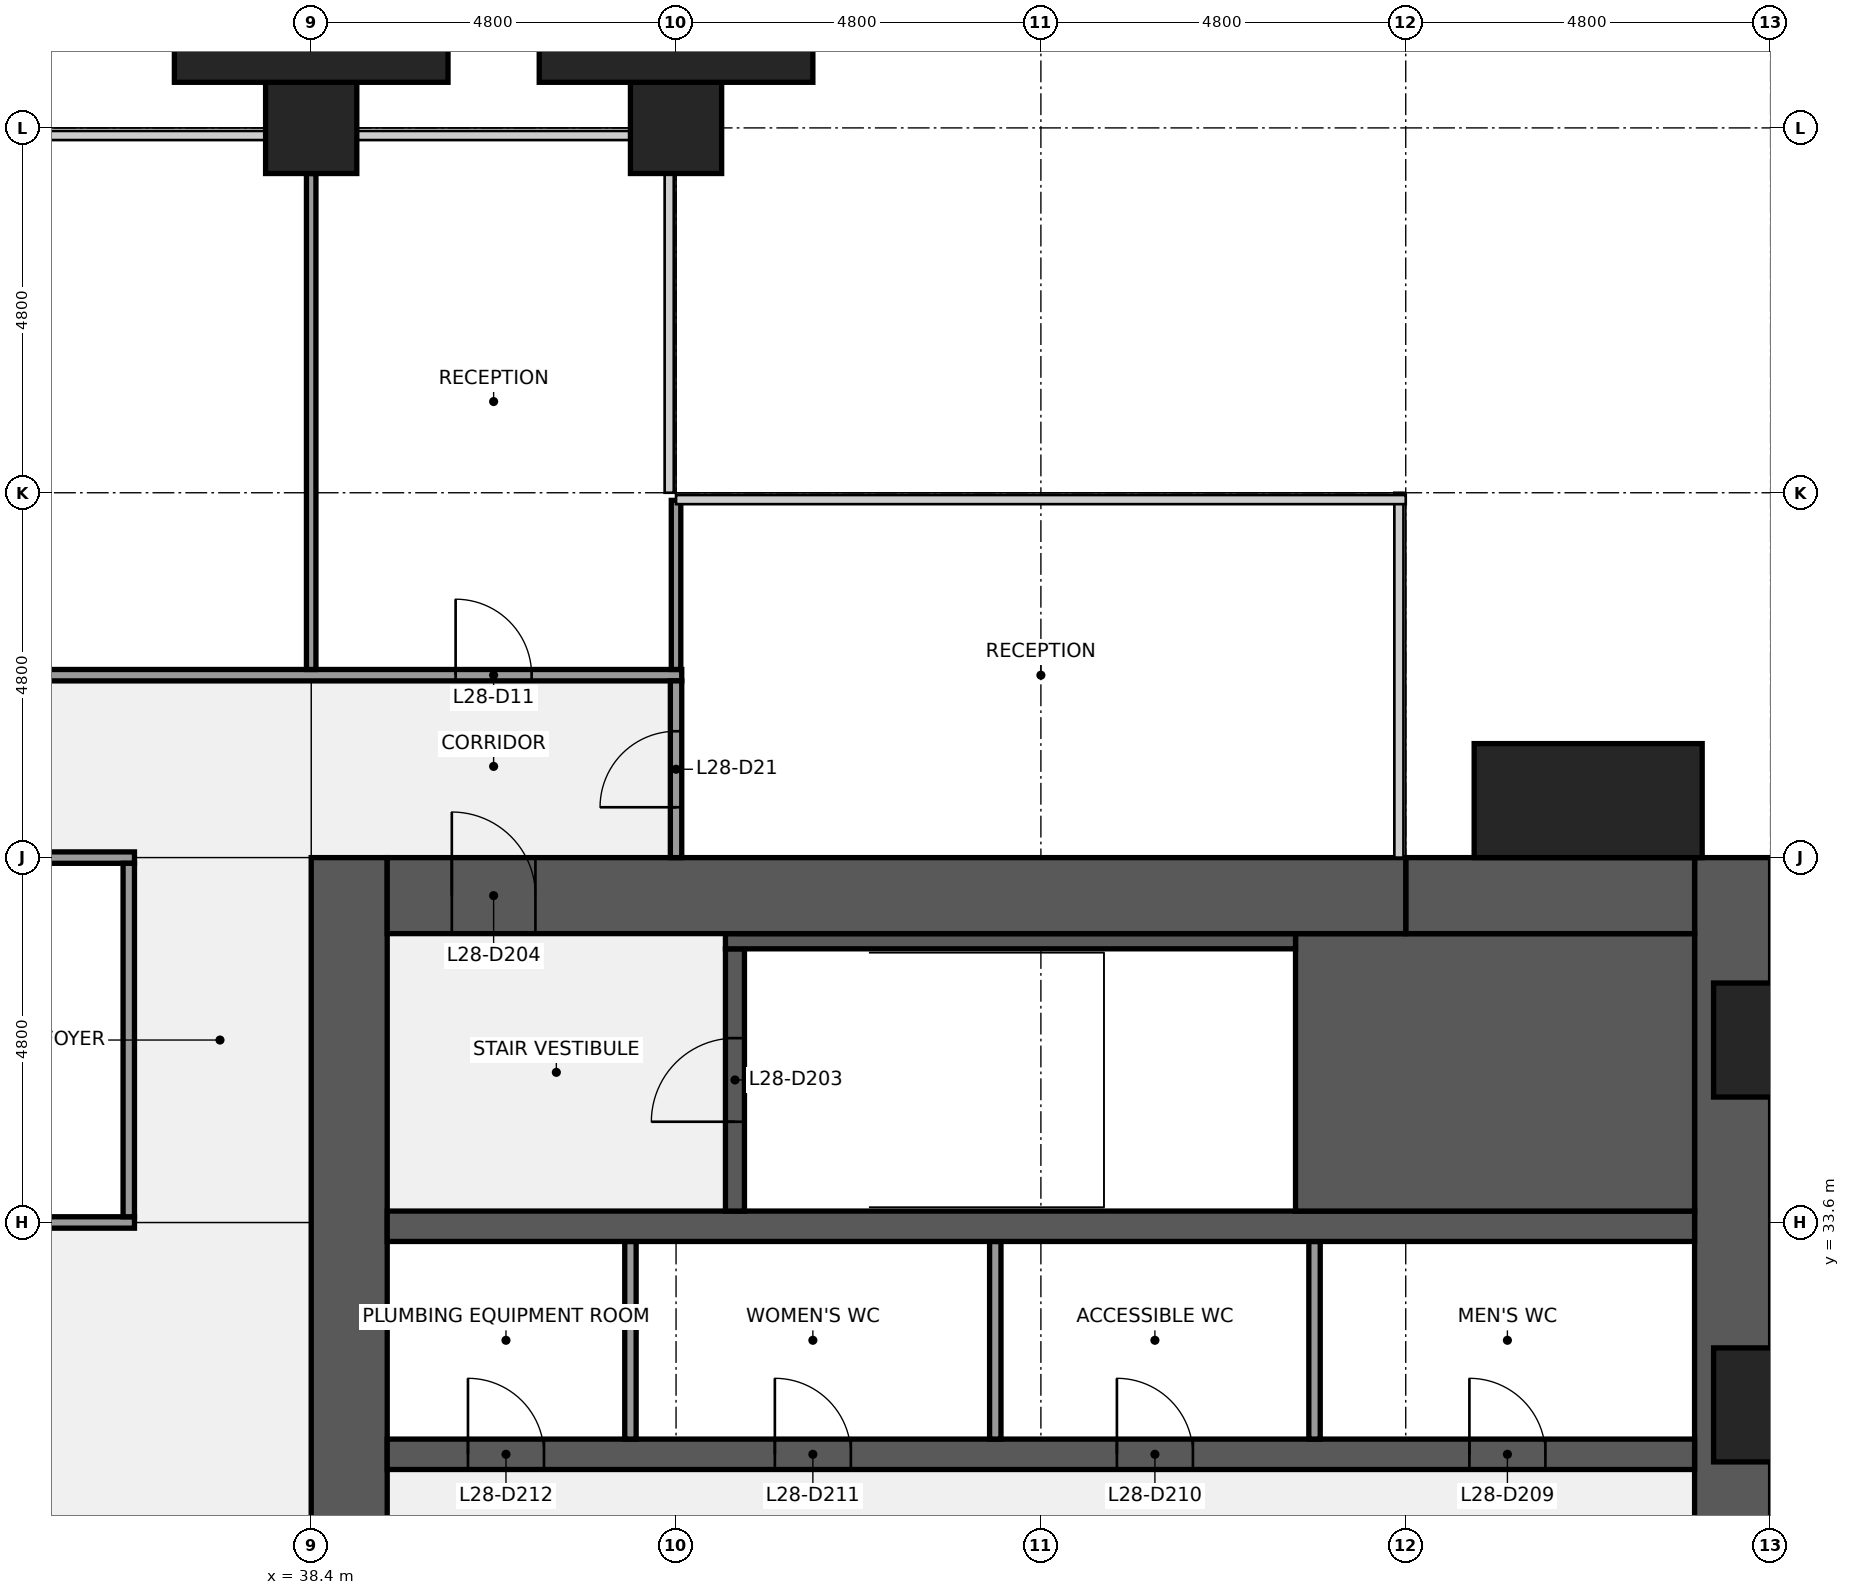
"""IFC4 building model, lengths in metres.
Left out: names, types, materials, properties, quantities, classifications, styles, units other than length and angle.
Written with IfcOpenShell. Run it as: python <this file> out.ifc"""

import sys

from ifc_helpers import new_model, si_unit, direction, frame, frame_2d, origin, origin_2d, place, context, subcontext, project, spatial, rectangle, extrude, element, fill, save


model = new_model("IFC4")
c1 = context("Model", 3, precision=1e-05, world=origin(), true_north=direction((0.0, 1.0)))
c2 = subcontext(c1, "Body", "Model", "MODEL_VIEW")
j1 = project(units=[si_unit("LENGTHUNIT", "METRE"), si_unit("PLANEANGLEUNIT", "RADIAN")], contexts=[c1])
p1 = place(None, origin())
s1 = spatial("IfcSite", under=j1, at=p1, CompositionType="ELEMENT")
p2 = place(p1, origin())
s2 = spatial("IfcBuilding", under=s1, at=p2, CompositionType="ELEMENT")
p3 = place(p2, frame((0.0, 0.0, 132.1)))
s3 = spatial("IfcBuildingStorey", under=s2, at=p3, CompositionType="ELEMENT", Elevation=132.1)
for number, where, z_axis, x_axis in (
    (1, (38.4, 48.0, 0.0), (0.0, 0.0, 1.0), (1.0, 0.0, 0.0)),
    (2, (43.2, 48.0, 0.0), (0.0, 0.0, 1.0), (1.0, 0.0, 0.0)),
):
    element("IfcColumn", number, at=place(p3, frame(where, z_axis=z_axis, x_axis=x_axis)), inside=s3, PredefinedType="COLUMN", context=c2, shape_type="SweptSolid", body=[
        extrude(rectangle(XDim=1.2, YDim=1.2, at=origin_2d()), origin(), (0.0, 0.0, 1.0), 4.0),
    ])
p4 = place(p3, frame((57.1, 38.4, 0.0), z_axis=(0.0, 0.0, 1.0), x_axis=(0.0, -1.0, 0.0)))
e3 = element("IfcWall", 3, at=p4, inside=s3, PredefinedType="SHEAR", context=c2, shape_type="SweptSolid", body=[
    extrude(rectangle(XDim=28.8, YDim=1.0, at=frame_2d((14.4, 0.0))), origin(), (0.0, 0.0, 1.0), 3.84),
])
p5 = place(p4, frame((18.45, 0.0, 0.9)))
e4 = element("IfcOpeningElement", 4, at=p5, cuts=e3, PredefinedType="OPENING", context=c2, shape_type="SweptSolid", body=[
    extrude(rectangle(XDim=1.5, YDim=1.5, at=frame_2d((0.75, 0.75))), frame((0.0, 0.51, 0.0), z_axis=(0.0, -1.0, 0.0), x_axis=(1.0, 0.0, 0.0)), (0.0, 0.0, 1.0), 1.02),
])
p6 = place(p4, frame((8.85, 0.0, 0.9)))
e5 = element("IfcOpeningElement", 5, at=p6, cuts=e3, PredefinedType="OPENING", context=c2, shape_type="SweptSolid", body=[
    extrude(rectangle(XDim=1.5, YDim=1.5, at=frame_2d((0.75, 0.75))), frame((0.0, 0.51, 0.0), z_axis=(0.0, -1.0, 0.0), x_axis=(1.0, 0.0, 0.0)), (0.0, 0.0, 1.0), 1.02),
])
p7 = place(p3, frame((38.9, 9.6, 0.0), z_axis=(0.0, 0.0, 1.0), x_axis=(0.0, 1.0, 0.0)))
e6 = element("IfcWall", 6, at=p7, inside=s3, PredefinedType="SHEAR", context=c2, shape_type="SweptSolid", body=[
    extrude(rectangle(XDim=28.8, YDim=1.0, at=frame_2d((14.4, 0.0))), origin(), (0.0, 0.0, 1.0), 3.84),
])
p8 = place(p7, frame((8.7, 0.0, 0.0)))
e7 = element("IfcOpeningElement", 7, at=p8, cuts=e6, PredefinedType="OPENING", context=c2, shape_type="SweptSolid", body=[
    extrude(rectangle(XDim=1.8, YDim=2.1, at=frame_2d((0.9, 1.05))), frame((0.0, 0.51, 0.0), z_axis=(0.0, -1.0, 0.0), x_axis=(1.0, 0.0, 0.0)), (0.0, 0.0, 1.0), 1.02),
])
p9 = place(p7, frame((18.3, 0.0, 0.0)))
e8 = element("IfcOpeningElement", 8, at=p9, cuts=e6, PredefinedType="OPENING", context=c2, shape_type="SweptSolid", body=[
    extrude(rectangle(XDim=1.8, YDim=2.1, at=frame_2d((0.9, 1.05))), frame((0.0, 0.51, 0.0), z_axis=(0.0, -1.0, 0.0), x_axis=(1.0, 0.0, 0.0)), (0.0, 0.0, 1.0), 1.02),
])
p10 = place(p3, frame((39.4, 30.55, 0.0), z_axis=(0.0, 0.0, 1.0), x_axis=(1.0, 0.0, 0.0)))
e9 = element("IfcWall", 9, at=p10, inside=s3, PredefinedType="SHEAR", context=c2, shape_type="SweptSolid", body=[
    extrude(rectangle(XDim=17.2, YDim=0.4, at=frame_2d((8.6, 0.0))), origin(), (0.0, 0.0, 1.0), 3.84),
])
p11 = place(p10, frame((14.238, 0.0, 0.0)))
e10 = element("IfcOpeningElement", 10, at=p11, cuts=e9, PredefinedType="OPENING", context=c2, shape_type="SweptSolid", body=[
    extrude(rectangle(XDim=1.0, YDim=2.1, at=frame_2d((0.5, 1.05))), frame((0.0, 0.21, 0.0), z_axis=(0.0, -1.0, 0.0), x_axis=(1.0, 0.0, 0.0)), (0.0, 0.0, 1.0), 0.42),
])
p12 = place(p10, frame((9.6, 0.0, 0.0)))
e11 = element("IfcOpeningElement", 11, at=p12, cuts=e9, PredefinedType="OPENING", context=c2, shape_type="SweptSolid", body=[
    extrude(rectangle(XDim=1.0, YDim=2.1, at=frame_2d((0.5, 1.05))), frame((0.0, 0.21, 0.0), z_axis=(0.0, -1.0, 0.0), x_axis=(1.0, 0.0, 0.0)), (0.0, 0.0, 1.0), 0.42),
])
p13 = place(p10, frame((5.1, 0.0, 0.0)))
e12 = element("IfcOpeningElement", 12, at=p13, cuts=e9, PredefinedType="OPENING", context=c2, shape_type="SweptSolid", body=[
    extrude(rectangle(XDim=1.0, YDim=2.1, at=frame_2d((0.5, 1.05))), frame((0.0, 0.21, 0.0), z_axis=(0.0, -1.0, 0.0), x_axis=(1.0, 0.0, 0.0)), (0.0, 0.0, 1.0), 0.42),
])
p14 = place(p10, frame((1.062, 0.0, 0.0)))
e13 = element("IfcOpeningElement", 13, at=p14, cuts=e9, PredefinedType="OPENING", context=c2, shape_type="SweptSolid", body=[
    extrude(rectangle(XDim=1.0, YDim=2.1, at=frame_2d((0.5, 1.05))), frame((0.0, 0.21, 0.0), z_axis=(0.0, -1.0, 0.0), x_axis=(1.0, 0.0, 0.0)), (0.0, 0.0, 1.0), 0.42),
])
for number, where, z_axis, x_axis in (
    (14, (51.6, 30.75, 0.0), (0.0, 0.0, 1.0), (0.0, 1.0, 0.0)),
    (15, (47.4, 30.75, 0.0), (0.0, 0.0, 1.0), (0.0, 1.0, 0.0)),
    (16, (42.6, 30.75, 0.0), (0.0, 0.0, 1.0), (0.0, 1.0, 0.0)),
):
    element("IfcWall", number, at=place(p3, frame(where, z_axis=z_axis, x_axis=x_axis)), inside=s3, PredefinedType="PARTITIONING", context=c2, shape_type="SweptSolid", body=[
        extrude(rectangle(XDim=2.6, YDim=0.15, at=frame_2d((1.3, 0.0))), origin(), (0.0, 0.0, 1.0), 3.84),
    ])
p15 = place(p3, frame((39.4, 33.55, 0.0), z_axis=(0.0, 0.0, 1.0), x_axis=(1.0, 0.0, 0.0)))
e17 = element("IfcWall", 17, at=p15, inside=s3, PredefinedType="SHEAR", context=c2, shape_type="SweptSolid", body=[
    extrude(rectangle(XDim=17.2, YDim=0.4, at=frame_2d((8.6, 0.0))), origin(), (0.0, 0.0, 1.0), 3.84),
])
p16 = place(p3, frame((51.35, 35.575, 0.0), z_axis=(0.0, 0.0, 1.0), x_axis=(1.0, 0.0, 0.0)))
e18 = element("IfcWall", 18, at=p16, inside=s3, PredefinedType="SHEAR", context=c2, shape_type="SweptSolid", body=[
    extrude(rectangle(XDim=5.25, YDim=3.65, at=frame_2d((2.625, 0.0))), origin(), (0.0, 0.0, 1.0), 3.84),
])
p17 = place(p3, frame((43.975, 33.75, 0.0), z_axis=(0.0, 0.0, 1.0), x_axis=(0.0, 1.0, 0.0)))
e19 = element("IfcWall", 19, at=p17, inside=s3, PredefinedType="SHEAR", context=c2, shape_type="SweptSolid", body=[
    extrude(rectangle(XDim=3.45, YDim=0.25, at=frame_2d((1.725, 0.0))), origin(), (0.0, 0.0, 1.0), 3.84),
])
p18 = place(p17, frame((1.175, 0.0, 0.0)))
e20 = element("IfcOpeningElement", 20, at=p18, cuts=e19, PredefinedType="OPENING", context=c2, shape_type="SweptSolid", body=[
    extrude(rectangle(XDim=1.1, YDim=2.1, at=frame_2d((0.55, 1.05))), frame((0.0, 0.135, 0.0), z_axis=(0.0, -1.0, 0.0), x_axis=(1.0, 0.0, 0.0)), (0.0, 0.0, 1.0), 0.27),
])
p19 = place(p3, frame((43.85, 37.3, 0.0), z_axis=(0.0, 0.0, 1.0), x_axis=(1.0, 0.0, 0.0)))
e21 = element("IfcWall", 21, at=p19, inside=s3, PredefinedType="SHEAR", context=c2, shape_type="SweptSolid", body=[
    extrude(rectangle(XDim=7.5, YDim=0.2, at=frame_2d((3.75, 0.0))), origin(), (0.0, 0.0, 1.0), 3.84),
])
p20 = place(p3, frame((52.8, 37.9, 0.0), z_axis=(0.0, 0.0, 1.0), x_axis=(1.0, 0.0, 0.0)))
e22 = element("IfcWall", 22, at=p20, inside=s3, PredefinedType="SHEAR", context=c2, shape_type="SweptSolid", body=[
    extrude(rectangle(XDim=3.8, YDim=1.0, at=frame_2d((1.9, 0.0))), origin(), (0.0, 0.0, 1.0), 3.84),
])
p21 = place(p3, frame((39.4, 37.9, 0.0), z_axis=(0.0, 0.0, 1.0), x_axis=(1.0, 0.0, 0.0)))
e23 = element("IfcWall", 23, at=p21, inside=s3, PredefinedType="SHEAR", context=c2, shape_type="SweptSolid", body=[
    extrude(rectangle(XDim=13.4, YDim=1.0, at=frame_2d((6.7, 0.0))), origin(), (0.0, 0.0, 1.0), 3.84),
])
p22 = place(p21, frame((0.85, 0.0, 0.0)))
e24 = element("IfcOpeningElement", 24, at=p22, cuts=e23, PredefinedType="OPENING", context=c2, shape_type="SweptSolid", body=[
    extrude(rectangle(XDim=1.1, YDim=2.1, at=frame_2d((0.55, 1.05))), frame((0.0, 0.51, 0.0), z_axis=(0.0, -1.0, 0.0), x_axis=(1.0, 0.0, 0.0)), (0.0, 0.0, 1.0), 1.02),
])
p23 = place(p3, frame((31.275, 33.6, 0.0), z_axis=(0.0, 0.0, 1.0), x_axis=(1.0, 0.0, 0.0)))
e25 = element("IfcWall", 25, at=p23, inside=s3, PredefinedType="PARTITIONING", context=c2, shape_type="SweptSolid", body=[
    extrude(rectangle(XDim=4.8, YDim=0.15, at=frame_2d((2.4, 0.0))), origin(), (0.0, 0.0, 1.0), 2.936),
])
p24 = place(p3, frame((21.525, 38.4, 0.0), z_axis=(0.0, 0.0, 1.0), x_axis=(1.0, 0.0, 0.0)))
e26 = element("IfcWall", 26, at=p24, inside=s3, PredefinedType="PARTITIONING", context=c2, shape_type="SweptSolid", body=[
    extrude(rectangle(XDim=14.55, YDim=0.15, at=frame_2d((7.275, 0.0))), origin(), (0.0, 0.0, 1.0), 2.936),
])
p25 = place(p24, frame((6.775, 0.0, 0.0)))
e27 = element("IfcOpeningElement", 27, at=p25, cuts=e26, PredefinedType="OPENING", context=c2, shape_type="SweptSolid", body=[
    extrude(rectangle(XDim=1.0, YDim=2.1, at=frame_2d((0.5, 1.05))), frame((0.0, 0.085, 0.0), z_axis=(0.0, -1.0, 0.0), x_axis=(1.0, 0.0, 0.0)), (0.0, 0.0, 1.0), 0.17),
])
p26 = place(p3, frame((14.325, 40.8, 0.0), z_axis=(0.0, 0.0, 1.0), x_axis=(1.0, 0.0, 0.0)))
e28 = element("IfcWall", 28, at=p26, inside=s3, PredefinedType="PARTITIONING", context=c2, shape_type="SweptSolid", body=[
    extrude(rectangle(XDim=28.95, YDim=0.15, at=frame_2d((14.475, 0.0))), origin(), (0.0, 0.0, 1.0), 2.936),
])
p27 = place(p26, frame((1.975, 0.0, 0.0)))
e29 = element("IfcOpeningElement", 29, at=p27, cuts=e28, PredefinedType="OPENING", context=c2, shape_type="SweptSolid", body=[
    extrude(rectangle(XDim=1.0, YDim=2.1, at=frame_2d((0.5, 1.05))), frame((0.0, 0.085, 0.0), z_axis=(0.0, -1.0, 0.0), x_axis=(1.0, 0.0, 0.0)), (0.0, 0.0, 1.0), 0.17),
])
p28 = place(p26, frame((7.975, 0.0, 0.0)))
e30 = element("IfcOpeningElement", 30, at=p28, cuts=e28, PredefinedType="OPENING", context=c2, shape_type="SweptSolid", body=[
    extrude(rectangle(XDim=1.0, YDim=2.1, at=frame_2d((0.5, 1.05))), frame((0.0, 0.085, 0.0), z_axis=(0.0, -1.0, 0.0), x_axis=(1.0, 0.0, 0.0)), (0.0, 0.0, 1.0), 0.17),
])
p29 = place(p26, frame((12.775, 0.0, 0.0)))
e31 = element("IfcOpeningElement", 31, at=p29, cuts=e28, PredefinedType="OPENING", context=c2, shape_type="SweptSolid", body=[
    extrude(rectangle(XDim=1.0, YDim=2.1, at=frame_2d((0.5, 1.05))), frame((0.0, 0.085, 0.0), z_axis=(0.0, -1.0, 0.0), x_axis=(1.0, 0.0, 0.0)), (0.0, 0.0, 1.0), 0.17),
])
p30 = place(p26, frame((18.775, 0.0, 0.0)))
e32 = element("IfcOpeningElement", 32, at=p30, cuts=e28, PredefinedType="OPENING", context=c2, shape_type="SweptSolid", body=[
    extrude(rectangle(XDim=1.0, YDim=2.1, at=frame_2d((0.5, 1.05))), frame((0.0, 0.085, 0.0), z_axis=(0.0, -1.0, 0.0), x_axis=(1.0, 0.0, 0.0)), (0.0, 0.0, 1.0), 0.17),
])
p31 = place(p26, frame((25.975, 0.0, 0.0)))
e33 = element("IfcOpeningElement", 33, at=p31, cuts=e28, PredefinedType="OPENING", context=c2, shape_type="SweptSolid", body=[
    extrude(rectangle(XDim=1.0, YDim=2.1, at=frame_2d((0.5, 1.05))), frame((0.0, 0.085, 0.0), z_axis=(0.0, -1.0, 0.0), x_axis=(1.0, 0.0, 0.0)), (0.0, 0.0, 1.0), 0.17),
])
p32 = place(p3, frame((36.0, 33.675, 0.0), z_axis=(0.0, 0.0, 1.0), x_axis=(0.0, 1.0, 0.0)))
e34 = element("IfcWall", 34, at=p32, inside=s3, PredefinedType="PARTITIONING", context=c2, shape_type="SweptSolid", body=[
    extrude(rectangle(XDim=4.65, YDim=0.15, at=frame_2d((2.325, 0.0))), origin(), (0.0, 0.0, 1.0), 2.936),
])
p33 = place(p3, frame((38.4, 40.875, 0.0), z_axis=(0.0, 0.0, 1.0), x_axis=(0.0, 1.0, 0.0)))
e35 = element("IfcWall", 35, at=p33, inside=s3, PredefinedType="PARTITIONING", context=c2, shape_type="SweptSolid", body=[
    extrude(rectangle(XDim=6.525, YDim=0.125, at=frame_2d((3.262, 0.0))), origin(), (0.0, 0.0, 1.0), 2.936),
])
p34 = place(p3, frame((43.2, 40.875, 0.0), z_axis=(0.0, 0.0, 1.0), x_axis=(0.0, 1.0, 0.0)))
e36 = element("IfcWall", 36, at=p34, inside=s3, PredefinedType="PARTITIONING", context=c2, shape_type="SweptSolid", body=[
    extrude(rectangle(XDim=2.225, YDim=0.125, at=frame_2d((1.113, 0.0))), origin(), (0.0, 0.0, 1.0), 2.936),
])
p35 = place(p3, frame((43.2, 38.4, 0.0), z_axis=(0.0, 0.0, 1.0), x_axis=(0.0, 1.0, 0.0)))
e37 = element("IfcWall", 37, at=p35, inside=s3, PredefinedType="PARTITIONING", context=c2, shape_type="SweptSolid", body=[
    extrude(rectangle(XDim=2.325, YDim=0.15, at=frame_2d((1.163, 0.0))), origin(), (0.0, 0.0, 1.0), 2.936),
])
p36 = place(p35, frame((0.663, 0.0, 0.0)))
e38 = element("IfcOpeningElement", 38, at=p36, cuts=e37, PredefinedType="OPENING", context=c2, shape_type="SweptSolid", body=[
    extrude(rectangle(XDim=1.0, YDim=2.1, at=frame_2d((0.5, 1.05))), frame((0.0, 0.085, 0.0), z_axis=(0.0, -1.0, 0.0), x_axis=(1.0, 0.0, 0.0)), (0.0, 0.0, 1.0), 0.17),
])
p37 = place(p3, frame((55.2, 39.15, 0.0), z_axis=(0.0, 0.0, 1.0), x_axis=(1.0, 0.0, 0.0)))
e39 = element("IfcColumn", 39, at=p37, inside=s3, PredefinedType="PILASTER", context=c2, shape_type="SweptSolid", body=[
    extrude(rectangle(XDim=3.0, YDim=1.5, at=origin_2d()), origin(), (0.0, 0.0, 1.0), 4.0),
])
for number, where, z_axis, x_axis in (
    (40, (38.4, 49.05, 0.0), (0.0, 0.0, 1.0), (1.0, 0.0, 0.0)),
    (41, (43.2, 49.05, 0.0), (0.0, 0.0, 1.0), (1.0, 0.0, 0.0)),
):
    element("IfcColumn", number, at=place(p3, frame(where, z_axis=z_axis, x_axis=x_axis)), inside=s3, PredefinedType="PILASTER", context=c2, shape_type="SweptSolid", body=[
        extrude(rectangle(XDim=3.6, YDim=0.9, at=origin_2d()), origin(), (0.0, 0.0, 1.0), 4.0),
    ])
p38 = place(p18, origin())
e42 = element("IfcDoor", 42, at=p38, inside=s3, OperationType="SINGLE_SWING_LEFT", PredefinedType="DOOR", context=c2, shape_type="SweptSolid", body=[
    extrude(rectangle(XDim=1.1, YDim=2.1, at=frame_2d((0.55, 1.05))), frame((0.0, 0.025, 0.0), z_axis=(0.0, -1.0, 0.0), x_axis=(1.0, 0.0, 0.0)), (0.0, 0.0, 1.0), 0.05),
])
fill(e20, e42)
p39 = place(p22, origin())
e43 = element("IfcDoor", 43, at=p39, inside=s3, OperationType="SINGLE_SWING_LEFT", PredefinedType="DOOR", context=c2, shape_type="SweptSolid", body=[
    extrude(rectangle(XDim=1.1, YDim=2.1, at=frame_2d((0.55, 1.05))), frame((0.0, 0.025, 0.0), z_axis=(0.0, -1.0, 0.0), x_axis=(1.0, 0.0, 0.0)), (0.0, 0.0, 1.0), 0.05),
])
fill(e24, e43)
p40 = place(p11, origin())
e44 = element("IfcDoor", 44, at=p40, inside=s3, OperationType="SINGLE_SWING_LEFT", PredefinedType="DOOR", context=c2, shape_type="SweptSolid", body=[
    extrude(rectangle(XDim=1.0, YDim=2.1, at=frame_2d((0.5, 1.05))), frame((0.0, 0.025, 0.0), z_axis=(0.0, -1.0, 0.0), x_axis=(1.0, 0.0, 0.0)), (0.0, 0.0, 1.0), 0.05),
])
fill(e10, e44)
p41 = place(p12, origin())
e45 = element("IfcDoor", 45, at=p41, inside=s3, OperationType="SINGLE_SWING_LEFT", PredefinedType="DOOR", context=c2, shape_type="SweptSolid", body=[
    extrude(rectangle(XDim=1.0, YDim=2.1, at=frame_2d((0.5, 1.05))), frame((0.0, 0.025, 0.0), z_axis=(0.0, -1.0, 0.0), x_axis=(1.0, 0.0, 0.0)), (0.0, 0.0, 1.0), 0.05),
])
fill(e11, e45)
p42 = place(p13, origin())
e46 = element("IfcDoor", 46, at=p42, inside=s3, OperationType="SINGLE_SWING_LEFT", PredefinedType="DOOR", context=c2, shape_type="SweptSolid", body=[
    extrude(rectangle(XDim=1.0, YDim=2.1, at=frame_2d((0.5, 1.05))), frame((0.0, 0.025, 0.0), z_axis=(0.0, -1.0, 0.0), x_axis=(1.0, 0.0, 0.0)), (0.0, 0.0, 1.0), 0.05),
])
fill(e12, e46)
p43 = place(p14, origin())
e47 = element("IfcDoor", 47, at=p43, inside=s3, OperationType="SINGLE_SWING_LEFT", PredefinedType="DOOR", context=c2, shape_type="SweptSolid", body=[
    extrude(rectangle(XDim=1.0, YDim=2.1, at=frame_2d((0.5, 1.05))), frame((0.0, 0.025, 0.0), z_axis=(0.0, -1.0, 0.0), x_axis=(1.0, 0.0, 0.0)), (0.0, 0.0, 1.0), 0.05),
])
fill(e13, e47)
p44 = place(p31, origin())
e48 = element("IfcDoor", 48, at=p44, inside=s3, OperationType="SINGLE_SWING_LEFT", PredefinedType="DOOR", context=c2, shape_type="SweptSolid", body=[
    extrude(rectangle(XDim=1.0, YDim=2.1, at=frame_2d((0.5, 1.05))), frame((0.0, 0.025, 0.0), z_axis=(0.0, -1.0, 0.0), x_axis=(1.0, 0.0, 0.0)), (0.0, 0.0, 1.0), 0.05),
])
fill(e33, e48)
p45 = place(p36, origin())
e49 = element("IfcDoor", 49, at=p45, inside=s3, OperationType="SINGLE_SWING_LEFT", PredefinedType="DOOR", context=c2, shape_type="SweptSolid", body=[
    extrude(rectangle(XDim=1.0, YDim=2.1, at=frame_2d((0.5, 1.05))), frame((0.0, 0.025, 0.0), z_axis=(0.0, -1.0, 0.0), x_axis=(1.0, 0.0, 0.0)), (0.0, 0.0, 1.0), 0.05),
])
fill(e38, e49)
save(model, sys.argv[1])
